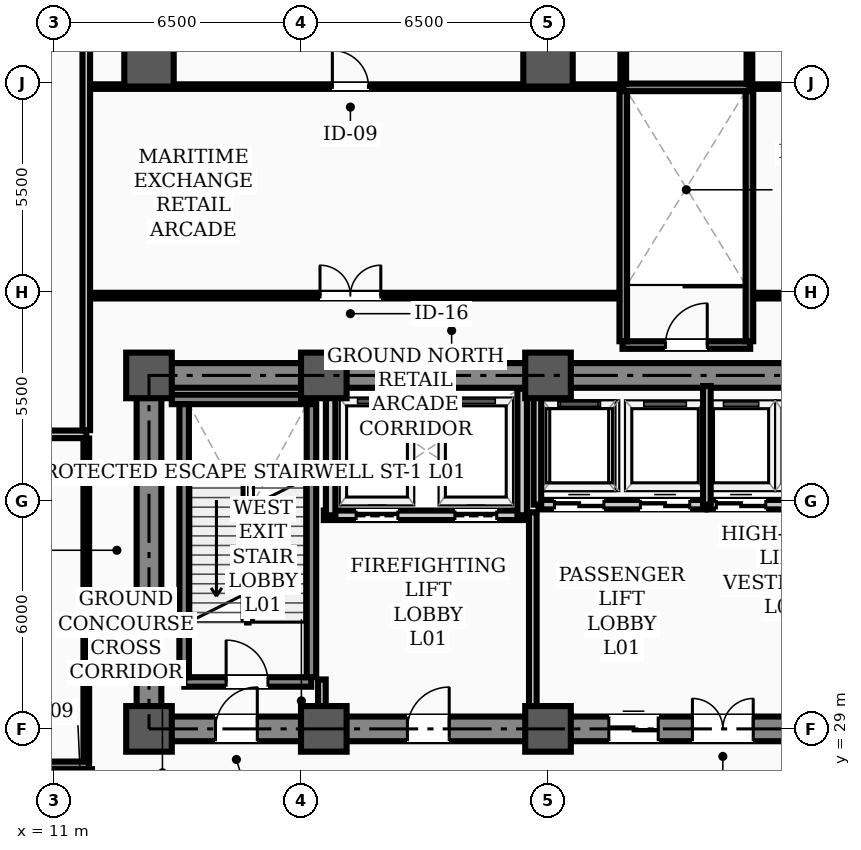
"""IFC4 building model, lengths in metres.
Left out: names, types, materials, properties, quantities, classifications, styles, units other than length and angle.
Written with IfcOpenShell. Run it as: python <this file> out.ifc"""

import sys

from ifc_helpers import new_model, si_unit, direction, frame, frame_2d, origin, origin_2d, place, context, subcontext, project, spatial, rectangle, hollow_rectangle, extrude, element, fill, save


model = new_model("IFC4")
c1 = context("Model", 3, precision=1e-05, world=origin(), true_north=direction((0.0, 1.0)))
c2 = subcontext(c1, "Body", "Model", "MODEL_VIEW")
j1 = project(units=[si_unit("LENGTHUNIT", "METRE"), si_unit("PLANEANGLEUNIT", "RADIAN")], contexts=[c1])
p1 = place(None, origin())
s1 = spatial("IfcSite", under=j1, at=p1, CompositionType="ELEMENT")
p2 = place(p1, origin())
s2 = spatial("IfcBuilding", under=s1, at=p2, CompositionType="ELEMENT")
p3 = place(p2, origin())
s3 = spatial("IfcBuildingStorey", under=s2, at=p3, CompositionType="ELEMENT", Elevation=0.0)
for number, where, z_axis, x_axis in (
    (1, (13.5, 29.0, 0.0), (0.0, 0.0, 1.0), (1.0, 0.0, 0.0)),
    (2, (13.5, 38.3, 0.0), (0.0, 0.0, 1.0), (1.0, 0.0, 0.0)),
    (3, (18.1, 29.0, 0.0), (0.0, 0.0, 1.0), (1.0, 0.0, 0.0)),
    (4, (18.1, 38.3, 0.0), (0.0, 0.0, 1.0), (1.0, 0.0, 0.0)),
    (5, (24.0, 29.0, 0.0), (0.0, 0.0, 1.0), (1.0, 0.0, 0.0)),
    (6, (24.0, 38.3, 0.0), (0.0, 0.0, 1.0), (1.0, 0.0, 0.0)),
):
    element("IfcColumn", number, at=place(p3, frame(where, z_axis=z_axis, x_axis=x_axis)), inside=s3, PredefinedType="COLUMN", context=c2, shape_type="SweptSolid", body=[
        extrude(hollow_rectangle(XDim=1.2, YDim=1.2, WallThickness=0.04, InnerFilletRadius=0.02, OuterFilletRadius=0.06, at=origin_2d()), origin(), (0.0, 0.0, 1.0), 5.8),
    ])
for number, where, z_axis, x_axis in (
    (7, (13.5, 46.55, 0.0), (0.0, 0.0, 1.0), (1.0, 0.0, 0.0)),
    (8, (24.0, 46.55, 0.0), (0.0, 0.0, 1.0), (1.0, 0.0, 0.0)),
):
    element("IfcColumn", number, at=place(p3, frame(where, z_axis=z_axis, x_axis=x_axis)), inside=s3, PredefinedType="COLUMN", context=c2, shape_type="SweptSolid", body=[
        extrude(rectangle(XDim=1.3, YDim=1.3, at=origin_2d()), origin(), (0.0, 0.0, 1.0), 5.8),
    ])
p4 = place(p3, frame((13.5, 29.0, 0.0), z_axis=(0.0, 0.0, 1.0), x_axis=(1.0, 0.0, 0.0)))
e9 = element("IfcWall", 9, at=p4, inside=s3, PredefinedType="SHEAR", context=c2, shape_type="SweptSolid", body=[
    extrude(rectangle(XDim=30.5, YDim=0.65, at=frame_2d((15.25, 0.0))), origin(), (0.0, 0.0, 1.0), 5.55),
])
p5 = place(p4, frame((1.75, 0.0, 0.0)))
e10 = element("IfcOpeningElement", 10, at=p5, cuts=e9, PredefinedType="OPENING", context=c2, shape_type="SweptSolid", body=[
    extrude(rectangle(XDim=1.1, YDim=2.08, at=frame_2d((0.55, 1.04))), frame((0.0, 0.335, 0.0), z_axis=(0.0, -1.0, 0.0), x_axis=(1.0, 0.0, 0.0)), (0.0, 0.0, 1.0), 0.67),
])
p6 = place(p4, frame((26.7, 0.0, 0.0)))
e11 = element("IfcOpeningElement", 11, at=p6, cuts=e9, PredefinedType="OPENING", context=c2, shape_type="SweptSolid", body=[
    extrude(rectangle(XDim=1.1, YDim=2.08, at=frame_2d((0.55, 1.04))), frame((0.0, 0.335, 0.0), z_axis=(0.0, -1.0, 0.0), x_axis=(1.0, 0.0, 0.0)), (0.0, 0.0, 1.0), 0.67),
])
p7 = place(p4, frame((6.8, 0.0, 0.0)))
e12 = element("IfcOpeningElement", 12, at=p7, cuts=e9, PredefinedType="OPENING", context=c2, shape_type="SweptSolid", body=[
    extrude(rectangle(XDim=1.1, YDim=2.08, at=frame_2d((0.55, 1.04))), frame((0.0, 0.335, 0.0), z_axis=(0.0, -1.0, 0.0), x_axis=(1.0, 0.0, 0.0)), (0.0, 0.0, 1.0), 0.67),
])
p8 = place(p4, frame((14.3, 0.0, 0.0)))
e13 = element("IfcOpeningElement", 13, at=p8, cuts=e9, PredefinedType="OPENING", context=c2, shape_type="SweptSolid", body=[
    extrude(rectangle(XDim=1.6, YDim=2.08, at=frame_2d((0.8, 1.04))), frame((0.0, 0.335, 0.0), z_axis=(0.0, -1.0, 0.0), x_axis=(1.0, 0.0, 0.0)), (0.0, 0.0, 1.0), 0.67),
])
p9 = place(p4, frame((20.525, 0.0, 0.0)))
e14 = element("IfcOpeningElement", 14, at=p9, cuts=e9, PredefinedType="OPENING", context=c2, shape_type="SweptSolid", body=[
    extrude(rectangle(XDim=0.95, YDim=2.08, at=frame_2d((0.475, 1.04))), frame((0.0, 0.335, 0.0), z_axis=(0.0, -1.0, 0.0), x_axis=(1.0, 0.0, 0.0)), (0.0, 0.0, 1.0), 0.67),
])
p10 = place(p4, frame((12.1, 0.0, 0.0)))
e15 = element("IfcOpeningElement", 15, at=p10, cuts=e9, PredefinedType="OPENING", context=c2, shape_type="SweptSolid", body=[
    extrude(rectangle(XDim=1.3, YDim=2.08, at=frame_2d((0.65, 1.04))), frame((0.0, 0.335, 0.0), z_axis=(0.0, -1.0, 0.0), x_axis=(1.0, 0.0, 0.0)), (0.0, 0.0, 1.0), 0.67),
])
p11 = place(p3, frame((13.5, 38.3, 0.0), z_axis=(0.0, 0.0, 1.0), x_axis=(1.0, 0.0, 0.0)))
e16 = element("IfcWall", 16, at=p11, inside=s3, PredefinedType="SHEAR", context=c2, shape_type="SweptSolid", body=[
    extrude(rectangle(XDim=30.5, YDim=0.65, at=frame_2d((15.25, 0.0))), origin(), (0.0, 0.0, 1.0), 5.55),
])
p12 = place(p3, frame((13.5, 29.35, 0.0), z_axis=(0.0, 0.0, 1.0), x_axis=(0.0, 1.0, 0.0)))
e17 = element("IfcWall", 17, at=p12, inside=s3, PredefinedType="SHEAR", context=c2, shape_type="SweptSolid", body=[
    extrude(rectangle(XDim=8.6, YDim=0.65, at=frame_2d((4.3, 0.0))), origin(), (0.0, 0.0, 1.0), 5.55),
])
p13 = place(p3, frame((14.43, 30.235, 0.0), z_axis=(0.0, 0.0, 1.0), x_axis=(1.0, 0.0, 0.0)))
e18 = element("IfcWall", 18, at=p13, inside=s3, PredefinedType="STANDARD", context=c2, shape_type="SweptSolid", body=[
    extrude(rectangle(XDim=3.34, YDim=0.25, at=frame_2d((1.67, 0.0))), origin(), (0.0, 0.0, 1.0), 5.55),
])
p14 = place(p13, frame((1.1, 0.0, 0.0)))
e19 = element("IfcOpeningElement", 19, at=p14, cuts=e18, PredefinedType="OPENING", context=c2, shape_type="SweptSolid", body=[
    extrude(rectangle(XDim=1.1, YDim=2.08, at=frame_2d((0.55, 1.04))), frame((0.0, 0.135, 0.0), z_axis=(0.0, -1.0, 0.0), x_axis=(1.0, 0.0, 0.0)), (0.0, 0.0, 1.0), 0.27),
])
p15 = place(p3, frame((14.1, 37.669, 0.0), z_axis=(0.0, 0.0, 1.0), x_axis=(1.0, 0.0, 0.0)))
e20 = element("IfcWall", 20, at=p15, inside=s3, PredefinedType="STANDARD", context=c2, shape_type="SweptSolid", body=[
    extrude(rectangle(XDim=3.67, YDim=0.25, at=frame_2d((1.835, 0.0))), origin(), (0.0, 0.0, 1.0), 5.55),
])
for number, where, z_axis, x_axis in (
    (21, (14.425, 30.36, 0.0), (0.0, 0.0, 1.0), (0.0, 1.0, 0.0)),
    (22, (17.775, 30.36, 0.0), (0.0, 0.0, 1.0), (0.0, 1.0, 0.0)),
):
    element("IfcWall", number, at=place(p3, frame(where, z_axis=z_axis, x_axis=x_axis)), inside=s3, PredefinedType="STANDARD", context=c2, shape_type="SweptSolid", body=[
        extrude(rectangle(XDim=7.184, YDim=0.25, at=frame_2d((3.592, 0.0))), origin(), (0.0, 0.0, 1.0), 5.55),
    ])
p16 = place(p3, frame((18.1, 34.62, 0.0), z_axis=(0.0, 0.0, 1.0), x_axis=(1.0, 0.0, 0.0)))
e23 = element("IfcWall", 23, at=p16, inside=s3, PredefinedType="STANDARD", context=c2, shape_type="SweptSolid", body=[
    extrude(rectangle(XDim=5.35, YDim=0.25, at=frame_2d((2.675, 0.0))), origin(), (0.0, 0.0, 1.0), 5.55),
])
p17 = place(p16, frame((0.85, 0.0, 0.0)))
e24 = element("IfcOpeningElement", 24, at=p17, cuts=e23, PredefinedType="OPENING", context=c2, shape_type="SweptSolid", body=[
    extrude(rectangle(XDim=1.1, YDim=2.08, at=frame_2d((0.55, 1.04))), frame((0.0, 0.135, 0.0), z_axis=(0.0, -1.0, 0.0), x_axis=(1.0, 0.0, 0.0)), (0.0, 0.0, 1.0), 0.27),
])
p18 = place(p16, frame((3.45, 0.0, 0.0)))
e25 = element("IfcOpeningElement", 25, at=p18, cuts=e23, PredefinedType="OPENING", context=c2, shape_type="SweptSolid", body=[
    extrude(rectangle(XDim=1.1, YDim=2.08, at=frame_2d((0.55, 1.04))), frame((0.0, 0.135, 0.0), z_axis=(0.0, -1.0, 0.0), x_axis=(1.0, 0.0, 0.0)), (0.0, 0.0, 1.0), 0.27),
])
for number, where, z_axis, x_axis in (
    (26, (18.28, 34.62, 0.0), (0.0, 0.0, 1.0), (0.0, 1.0, 0.0)),
    (27, (23.32, 34.62, 0.0), (0.0, 0.0, 1.0), (0.0, 1.0, 0.0)),
):
    element("IfcWall", number, at=place(p3, frame(where, z_axis=z_axis, x_axis=x_axis)), inside=s3, PredefinedType="STANDARD", context=c2, shape_type="SweptSolid", body=[
        extrude(rectangle(XDim=3.33, YDim=0.25, at=frame_2d((1.665, 0.0))), origin(), (0.0, 0.0, 1.0), 4.73),
    ])
p19 = place(p3, frame((23.75, 34.9, 0.0), z_axis=(0.0, 0.0, 1.0), x_axis=(1.0, 0.0, 0.0)))
e28 = element("IfcWall", 28, at=p19, inside=s3, PredefinedType="STANDARD", context=c2, shape_type="SweptSolid", body=[
    extrude(rectangle(XDim=4.4, YDim=0.25, at=frame_2d((2.2, 0.0))), origin(), (0.0, 0.0, 1.0), 5.55),
])
p20 = place(p19, frame((0.42, 0.0, 0.0)))
e29 = element("IfcOpeningElement", 29, at=p20, cuts=e28, PredefinedType="OPENING", context=c2, shape_type="SweptSolid", body=[
    extrude(rectangle(XDim=1.3, YDim=2.08, at=frame_2d((0.65, 1.04))), frame((0.0, 0.135, 0.0), z_axis=(0.0, -1.0, 0.0), x_axis=(1.0, 0.0, 0.0)), (0.0, 0.0, 1.0), 0.27),
])
p21 = place(p19, frame((2.68, 0.0, 0.0)))
e30 = element("IfcOpeningElement", 30, at=p21, cuts=e28, PredefinedType="OPENING", context=c2, shape_type="SweptSolid", body=[
    extrude(rectangle(XDim=1.3, YDim=2.08, at=frame_2d((0.65, 1.04))), frame((0.0, 0.135, 0.0), z_axis=(0.0, -1.0, 0.0), x_axis=(1.0, 0.0, 0.0)), (0.0, 0.0, 1.0), 0.27),
])
p22 = place(p3, frame((28.2, 34.9, 0.0), z_axis=(0.0, 0.0, 1.0), x_axis=(1.0, 0.0, 0.0)))
e31 = element("IfcWall", 31, at=p22, inside=s3, PredefinedType="STANDARD", context=c2, shape_type="SweptSolid", body=[
    extrude(rectangle(XDim=3.55, YDim=0.25, at=frame_2d((1.775, 0.0))), origin(), (0.0, 0.0, 1.0), 5.55),
])
p23 = place(p22, frame((0.23, 0.0, 0.0)))
e32 = element("IfcOpeningElement", 32, at=p23, cuts=e31, PredefinedType="OPENING", context=c2, shape_type="SweptSolid", body=[
    extrude(rectangle(XDim=1.3, YDim=2.08, at=frame_2d((0.65, 1.04))), frame((0.0, 0.135, 0.0), z_axis=(0.0, -1.0, 0.0), x_axis=(1.0, 0.0, 0.0)), (0.0, 0.0, 1.0), 0.27),
])
p24 = place(p22, frame((2.03, 0.0, 0.0)))
e33 = element("IfcOpeningElement", 33, at=p24, cuts=e31, PredefinedType="OPENING", context=c2, shape_type="SweptSolid", body=[
    extrude(rectangle(XDim=1.3, YDim=2.08, at=frame_2d((0.65, 1.04))), frame((0.0, 0.135, 0.0), z_axis=(0.0, -1.0, 0.0), x_axis=(1.0, 0.0, 0.0)), (0.0, 0.0, 1.0), 0.27),
])
p25 = place(p3, frame((25.96, 39.1, 0.0), z_axis=(0.0, 0.0, 1.0), x_axis=(1.0, 0.0, 0.0)))
e34 = element("IfcWall", 34, at=p25, inside=s3, PredefinedType="STANDARD", context=c2, shape_type="SweptSolid", body=[
    extrude(rectangle(XDim=3.36, YDim=0.2, at=frame_2d((1.68, 0.0))), origin(), (0.0, 0.0, 1.0), 5.55),
])
p26 = place(p25, frame((1.13, 0.0, 0.0)))
e35 = element("IfcOpeningElement", 35, at=p26, cuts=e34, PredefinedType="OPENING", context=c2, shape_type="SweptSolid", body=[
    extrude(rectangle(XDim=1.1, YDim=2.08, at=frame_2d((0.55, 1.04))), frame((0.0, 0.11, 0.0), z_axis=(0.0, -1.0, 0.0), x_axis=(1.0, 0.0, 0.0)), (0.0, 0.0, 1.0), 0.22),
])
p27 = place(p3, frame((25.96, 45.88, 0.0), z_axis=(0.0, 0.0, 1.0), x_axis=(1.0, 0.0, 0.0)))
e36 = element("IfcWall", 36, at=p27, inside=s3, PredefinedType="STANDARD", context=c2, shape_type="SweptSolid", body=[
    extrude(rectangle(XDim=3.36, YDim=0.2, at=frame_2d((1.68, 0.0))), origin(), (0.0, 0.0, 1.0), 5.55),
])
for number, where, z_axis, x_axis in (
    (37, (25.98, 39.2, 0.0), (0.0, 0.0, 1.0), (0.0, 1.0, 0.0)),
    (38, (29.3, 39.2, 0.0), (0.0, 0.0, 1.0), (0.0, 1.0, 0.0)),
):
    element("IfcWall", number, at=place(p3, frame(where, z_axis=z_axis, x_axis=x_axis)), inside=s3, PredefinedType="STANDARD", context=c2, shape_type="SweptSolid", body=[
        extrude(rectangle(XDim=6.58, YDim=0.2, at=frame_2d((3.29, 0.0))), origin(), (0.0, 0.0, 1.0), 5.55),
    ])
p28 = place(p3, frame((8.56, 28.04, 0.0), z_axis=(0.0, 0.0, 1.0), x_axis=(1.0, 0.0, 0.0)))
e39 = element("IfcWall", 39, at=p28, inside=s3, PredefinedType="STANDARD", context=c2, shape_type="SweptSolid", body=[
    extrude(rectangle(XDim=3.36, YDim=0.2, at=frame_2d((1.68, 0.0))), origin(), (0.0, 0.0, 1.0), 5.55),
])
p29 = place(p3, frame((11.9, 21.1, 0.0), z_axis=(0.0, 0.0, 1.0), x_axis=(0.0, 1.0, 0.0)))
e40 = element("IfcWall", 40, at=p29, inside=s3, PredefinedType="STANDARD", context=c2, shape_type="SweptSolid", body=[
    extrude(rectangle(XDim=6.84, YDim=0.2, at=frame_2d((3.42, 0.0))), origin(), (0.0, 0.0, 1.0), 5.55),
])
p30 = place(p3, frame((6.28, 36.75, 0.0), z_axis=(0.0, 0.0, 1.0), x_axis=(1.0, 0.0, 0.0)))
e41 = element("IfcWall", 41, at=p30, inside=s3, PredefinedType="STANDARD", context=c2, shape_type="SweptSolid", body=[
    extrude(rectangle(XDim=5.57, YDim=0.2, at=frame_2d((2.785, 0.0))), origin(), (0.0, 0.0, 1.0), 5.08),
])
p31 = place(p3, frame((11.85, 45.9, 0.0), z_axis=(0.0, 0.0, 1.0), x_axis=(1.0, 0.0, 0.0)))
e42 = element("IfcWall", 42, at=p31, inside=s3, PredefinedType="PARTITIONING", context=c2, shape_type="SweptSolid", body=[
    extrude(rectangle(XDim=14.13, YDim=0.12, at=frame_2d((7.065, 0.0))), origin(), (0.0, 0.0, 1.0), 4.83),
])
p32 = place(p31, frame((6.475, 0.0, 0.0)))
e43 = element("IfcOpeningElement", 43, at=p32, cuts=e42, PredefinedType="OPENING", context=c2, shape_type="SweptSolid", body=[
    extrude(rectangle(XDim=0.95, YDim=2.08, at=frame_2d((0.475, 1.04))), frame((0.0, 0.07, 0.0), z_axis=(0.0, -1.0, 0.0), x_axis=(1.0, 0.0, 0.0)), (0.0, 0.0, 1.0), 0.14),
])
p33 = place(p3, frame((29.3, 45.9, 0.0), z_axis=(0.0, 0.0, 1.0), x_axis=(1.0, 0.0, 0.0)))
e44 = element("IfcWall", 44, at=p33, inside=s3, PredefinedType="PARTITIONING", context=c2, shape_type="SweptSolid", body=[
    extrude(rectangle(XDim=10.2, YDim=0.12, at=frame_2d((5.1, 0.0))), origin(), (0.0, 0.0, 1.0), 4.83),
])
p34 = place(p33, frame((4.475, 0.0, 0.0)))
e45 = element("IfcOpeningElement", 45, at=p34, cuts=e44, PredefinedType="OPENING", context=c2, shape_type="SweptSolid", body=[
    extrude(rectangle(XDim=0.95, YDim=2.08, at=frame_2d((0.475, 1.04))), frame((0.0, 0.07, 0.0), z_axis=(0.0, -1.0, 0.0), x_axis=(1.0, 0.0, 0.0)), (0.0, 0.0, 1.0), 0.14),
])
p35 = place(p3, frame((11.85, 40.4, 0.0), z_axis=(0.0, 0.0, 1.0), x_axis=(1.0, 0.0, 0.0)))
e46 = element("IfcWall", 46, at=p35, inside=s3, PredefinedType="PARTITIONING", context=c2, shape_type="SweptSolid", body=[
    extrude(rectangle(XDim=14.02, YDim=0.15, at=frame_2d((7.01, 0.0))), origin(), (0.0, 0.0, 1.0), 4.83),
])
p36 = place(p35, frame((6.15, 0.0, 0.0)))
e47 = element("IfcOpeningElement", 47, at=p36, cuts=e46, PredefinedType="OPENING", context=c2, shape_type="SweptSolid", body=[
    extrude(rectangle(XDim=1.6, YDim=2.08, at=frame_2d((0.8, 1.04))), frame((0.0, 0.085, 0.0), z_axis=(0.0, -1.0, 0.0), x_axis=(1.0, 0.0, 0.0)), (0.0, 0.0, 1.0), 0.17),
])
p37 = place(p3, frame((29.41, 40.4, 0.0), z_axis=(0.0, 0.0, 1.0), x_axis=(1.0, 0.0, 0.0)))
e48 = element("IfcWall", 48, at=p37, inside=s3, PredefinedType="PARTITIONING", context=c2, shape_type="SweptSolid", body=[
    extrude(rectangle(XDim=10.09, YDim=0.15, at=frame_2d((5.045, 0.0))), origin(), (0.0, 0.0, 1.0), 4.83),
])
p38 = place(p37, frame((4.04, 0.0, 0.0)))
e49 = element("IfcOpeningElement", 49, at=p38, cuts=e48, PredefinedType="OPENING", context=c2, shape_type="SweptSolid", body=[
    extrude(rectangle(XDim=1.6, YDim=2.08, at=frame_2d((0.8, 1.04))), frame((0.0, 0.085, 0.0), z_axis=(0.0, -1.0, 0.0), x_axis=(1.0, 0.0, 0.0)), (0.0, 0.0, 1.0), 0.17),
])
p39 = place(p3, frame((11.85, 36.86, 0.0), z_axis=(0.0, 0.0, 1.0), x_axis=(0.0, 1.0, 0.0)))
e50 = element("IfcWall", 50, at=p39, inside=s3, PredefinedType="STANDARD", context=c2, shape_type="SweptSolid", body=[
    extrude(rectangle(XDim=14.17, YDim=0.2, at=frame_2d((7.085, 0.0))), origin(), (0.0, 0.0, 1.0), 4.73),
])
for number, where, z_axis, x_axis in (
    (51, (25.98, 45.97, 0.0), (0.0, 0.0, 1.0), (0.0, 1.0, 0.0)),
    (52, (29.3, 45.97, 0.0), (0.0, 0.0, 1.0), (0.0, 1.0, 0.0)),
):
    element("IfcWall", number, at=place(p3, frame(where, z_axis=z_axis, x_axis=x_axis)), inside=s3, PredefinedType="PARTITIONING", context=c2, shape_type="SweptSolid", body=[
        extrude(rectangle(XDim=5.06, YDim=0.15, at=frame_2d((2.53, 0.0))), origin(), (0.0, 0.0, 1.0), 4.73),
    ])
p40 = place(p3, frame((11.85, 28.15, 0.0), z_axis=(0.0, 0.0, 1.0), x_axis=(0.0, 1.0, 0.0)))
e53 = element("IfcWall", 53, at=p40, inside=s3, PredefinedType="PARTITIONING", context=c2, shape_type="SweptSolid", body=[
    extrude(rectangle(XDim=8.49, YDim=0.15, at=frame_2d((4.245, 0.0))), origin(), (0.0, 0.0, 1.0), 4.73),
])
p41 = place(p3, frame((18.05, 29.335, 0.0), z_axis=(0.0, 0.0, 1.0), x_axis=(0.0, 1.0, 0.0)))
e54 = element("IfcWall", 54, at=p41, inside=s3, PredefinedType="STANDARD", context=c2, shape_type="SweptSolid", body=[
    extrude(rectangle(XDim=0.965, YDim=0.2, at=frame_2d((0.482, 0.0))), origin(), (0.0, 0.0, 1.0), 4.73),
])
p42 = place(p3, frame((23.6, 29.335, 0.0), z_axis=(0.0, 0.0, 1.0), x_axis=(0.0, 1.0, 0.0)))
e55 = element("IfcWall", 55, at=p42, inside=s3, PredefinedType="STANDARD", context=c2, shape_type="SweptSolid", body=[
    extrude(rectangle(XDim=5.365, YDim=0.2, at=frame_2d((2.683, 0.0))), origin(), (0.0, 0.0, 1.0), 4.73),
])
for number, where, z_axis, x_axis in (
    (56, (23.72, 34.9, 0.0), (0.0, 0.0, 1.0), (0.0, 1.0, 0.0)),
    (57, (28.18, 34.9, 0.0), (0.0, 0.0, 1.0), (0.0, 1.0, 0.0)),
):
    element("IfcWall", number, at=place(p3, frame(where, z_axis=z_axis, x_axis=x_axis)), inside=s3, PredefinedType="STANDARD", context=c2, shape_type="SweptSolid", body=[
        extrude(rectangle(XDim=3.12, YDim=0.2, at=frame_2d((1.56, 0.0))), origin(), (0.0, 0.0, 1.0), 4.73),
    ])
p43 = place(p14, origin())
e58 = element("IfcDoor", 58, at=p43, inside=s3, OperationType="SINGLE_SWING_LEFT", PredefinedType="DOOR", context=c2, shape_type="SweptSolid", body=[
    extrude(rectangle(XDim=1.1, YDim=2.08, at=frame_2d((0.55, 1.04))), frame((0.0, 0.025, 0.0), z_axis=(0.0, -1.0, 0.0), x_axis=(1.0, 0.0, 0.0)), (0.0, 0.0, 1.0), 0.05),
])
fill(e19, e58)
p44 = place(p26, origin())
e59 = element("IfcDoor", 59, at=p44, inside=s3, OperationType="SINGLE_SWING_RIGHT", PredefinedType="DOOR", context=c2, shape_type="SweptSolid", body=[
    extrude(rectangle(XDim=1.1, YDim=2.08, at=frame_2d((0.55, 1.04))), frame((0.0, 0.025, 0.0), z_axis=(0.0, -1.0, 0.0), x_axis=(1.0, 0.0, 0.0)), (0.0, 0.0, 1.0), 0.05),
])
fill(e35, e59)
p45 = place(p36, origin())
e60 = element("IfcDoor", 60, at=p45, inside=s3, OperationType="DOUBLE_DOOR_SINGLE_SWING", PredefinedType="DOOR", context=c2, shape_type="SweptSolid", body=[
    extrude(rectangle(XDim=1.6, YDim=2.08, at=frame_2d((0.8, 1.04))), frame((0.0, 0.025, 0.0), z_axis=(0.0, -1.0, 0.0), x_axis=(1.0, 0.0, 0.0)), (0.0, 0.0, 1.0), 0.05),
])
fill(e47, e60)
p46 = place(p32, origin())
e61 = element("IfcDoor", 61, at=p46, inside=s3, OperationType="SINGLE_SWING_LEFT", PredefinedType="DOOR", context=c2, shape_type="SweptSolid", body=[
    extrude(rectangle(XDim=0.95, YDim=2.08, at=frame_2d((0.475, 1.04))), frame((0.0, 0.025, 0.0), z_axis=(0.0, -1.0, 0.0), x_axis=(1.0, 0.0, 0.0)), (0.0, 0.0, 1.0), 0.05),
])
fill(e43, e61)
p47 = place(p5, origin())
e62 = element("IfcDoor", 62, at=p47, inside=s3, OperationType="SINGLE_SWING_RIGHT", PredefinedType="DOOR", context=c2, shape_type="SweptSolid", body=[
    extrude(rectangle(XDim=1.1, YDim=2.08, at=frame_2d((0.55, 1.04))), frame((0.0, 0.025, 0.0), z_axis=(0.0, -1.0, 0.0), x_axis=(1.0, 0.0, 0.0)), (0.0, 0.0, 1.0), 0.05),
])
fill(e10, e62)
p48 = place(p7, origin())
e63 = element("IfcDoor", 63, at=p48, inside=s3, OperationType="SINGLE_SWING_RIGHT", PredefinedType="DOOR", context=c2, shape_type="SweptSolid", body=[
    extrude(rectangle(XDim=1.1, YDim=2.08, at=frame_2d((0.55, 1.04))), frame((0.0, 0.025, 0.0), z_axis=(0.0, -1.0, 0.0), x_axis=(1.0, 0.0, 0.0)), (0.0, 0.0, 1.0), 0.05),
])
fill(e12, e63)
p49 = place(p8, origin())
e64 = element("IfcDoor", 64, at=p49, inside=s3, OperationType="DOUBLE_DOOR_SINGLE_SWING", PredefinedType="DOOR", context=c2, shape_type="SweptSolid", body=[
    extrude(rectangle(XDim=1.6, YDim=2.08, at=frame_2d((0.8, 1.04))), frame((0.0, 0.025, 0.0), z_axis=(0.0, -1.0, 0.0), x_axis=(1.0, 0.0, 0.0)), (0.0, 0.0, 1.0), 0.05),
])
fill(e13, e64)
p50 = place(p17, origin())
e65 = element("IfcDoor", 65, at=p50, inside=s3, OperationType="SLIDING_TO_LEFT", PredefinedType="DOOR", context=c2, shape_type="SweptSolid", body=[
    extrude(rectangle(XDim=1.1, YDim=2.08, at=frame_2d((0.55, 1.04))), frame((0.0, 0.025, 0.0), z_axis=(0.0, -1.0, 0.0), x_axis=(1.0, 0.0, 0.0)), (0.0, 0.0, 1.0), 0.05),
])
fill(e24, e65)
p51 = place(p18, origin())
e66 = element("IfcDoor", 66, at=p51, inside=s3, OperationType="SLIDING_TO_LEFT", PredefinedType="DOOR", context=c2, shape_type="SweptSolid", body=[
    extrude(rectangle(XDim=1.1, YDim=2.08, at=frame_2d((0.55, 1.04))), frame((0.0, 0.025, 0.0), z_axis=(0.0, -1.0, 0.0), x_axis=(1.0, 0.0, 0.0)), (0.0, 0.0, 1.0), 0.05),
])
fill(e25, e66)
p52 = place(p20, origin())
e67 = element("IfcDoor", 67, at=p52, inside=s3, OperationType="DOUBLE_DOOR_SLIDING", PredefinedType="DOOR", context=c2, shape_type="SweptSolid", body=[
    extrude(rectangle(XDim=1.3, YDim=2.08, at=frame_2d((0.65, 1.04))), frame((0.0, 0.025, 0.0), z_axis=(0.0, -1.0, 0.0), x_axis=(1.0, 0.0, 0.0)), (0.0, 0.0, 1.0), 0.05),
])
fill(e29, e67)
p53 = place(p21, origin())
e68 = element("IfcDoor", 68, at=p53, inside=s3, OperationType="DOUBLE_DOOR_SLIDING", PredefinedType="DOOR", context=c2, shape_type="SweptSolid", body=[
    extrude(rectangle(XDim=1.3, YDim=2.08, at=frame_2d((0.65, 1.04))), frame((0.0, 0.025, 0.0), z_axis=(0.0, -1.0, 0.0), x_axis=(1.0, 0.0, 0.0)), (0.0, 0.0, 1.0), 0.05),
])
fill(e30, e68)
p54 = place(p23, origin())
e69 = element("IfcDoor", 69, at=p54, inside=s3, OperationType="DOUBLE_DOOR_SLIDING", PredefinedType="DOOR", context=c2, shape_type="SweptSolid", body=[
    extrude(rectangle(XDim=1.3, YDim=2.08, at=frame_2d((0.65, 1.04))), frame((0.0, 0.025, 0.0), z_axis=(0.0, -1.0, 0.0), x_axis=(1.0, 0.0, 0.0)), (0.0, 0.0, 1.0), 0.05),
])
fill(e32, e69)
p55 = place(p10, origin())
e70 = element("IfcDoor", 70, at=p55, inside=s3, OperationType="DOUBLE_DOOR_SLIDING", PredefinedType="DOOR", context=c2, shape_type="SweptSolid", body=[
    extrude(rectangle(XDim=1.3, YDim=2.08, at=frame_2d((0.65, 1.04))), frame((0.0, 0.025, 0.0), z_axis=(0.0, -1.0, 0.0), x_axis=(1.0, 0.0, 0.0)), (0.0, 0.0, 1.0), 0.05),
])
fill(e15, e70)
save(model, sys.argv[1])
